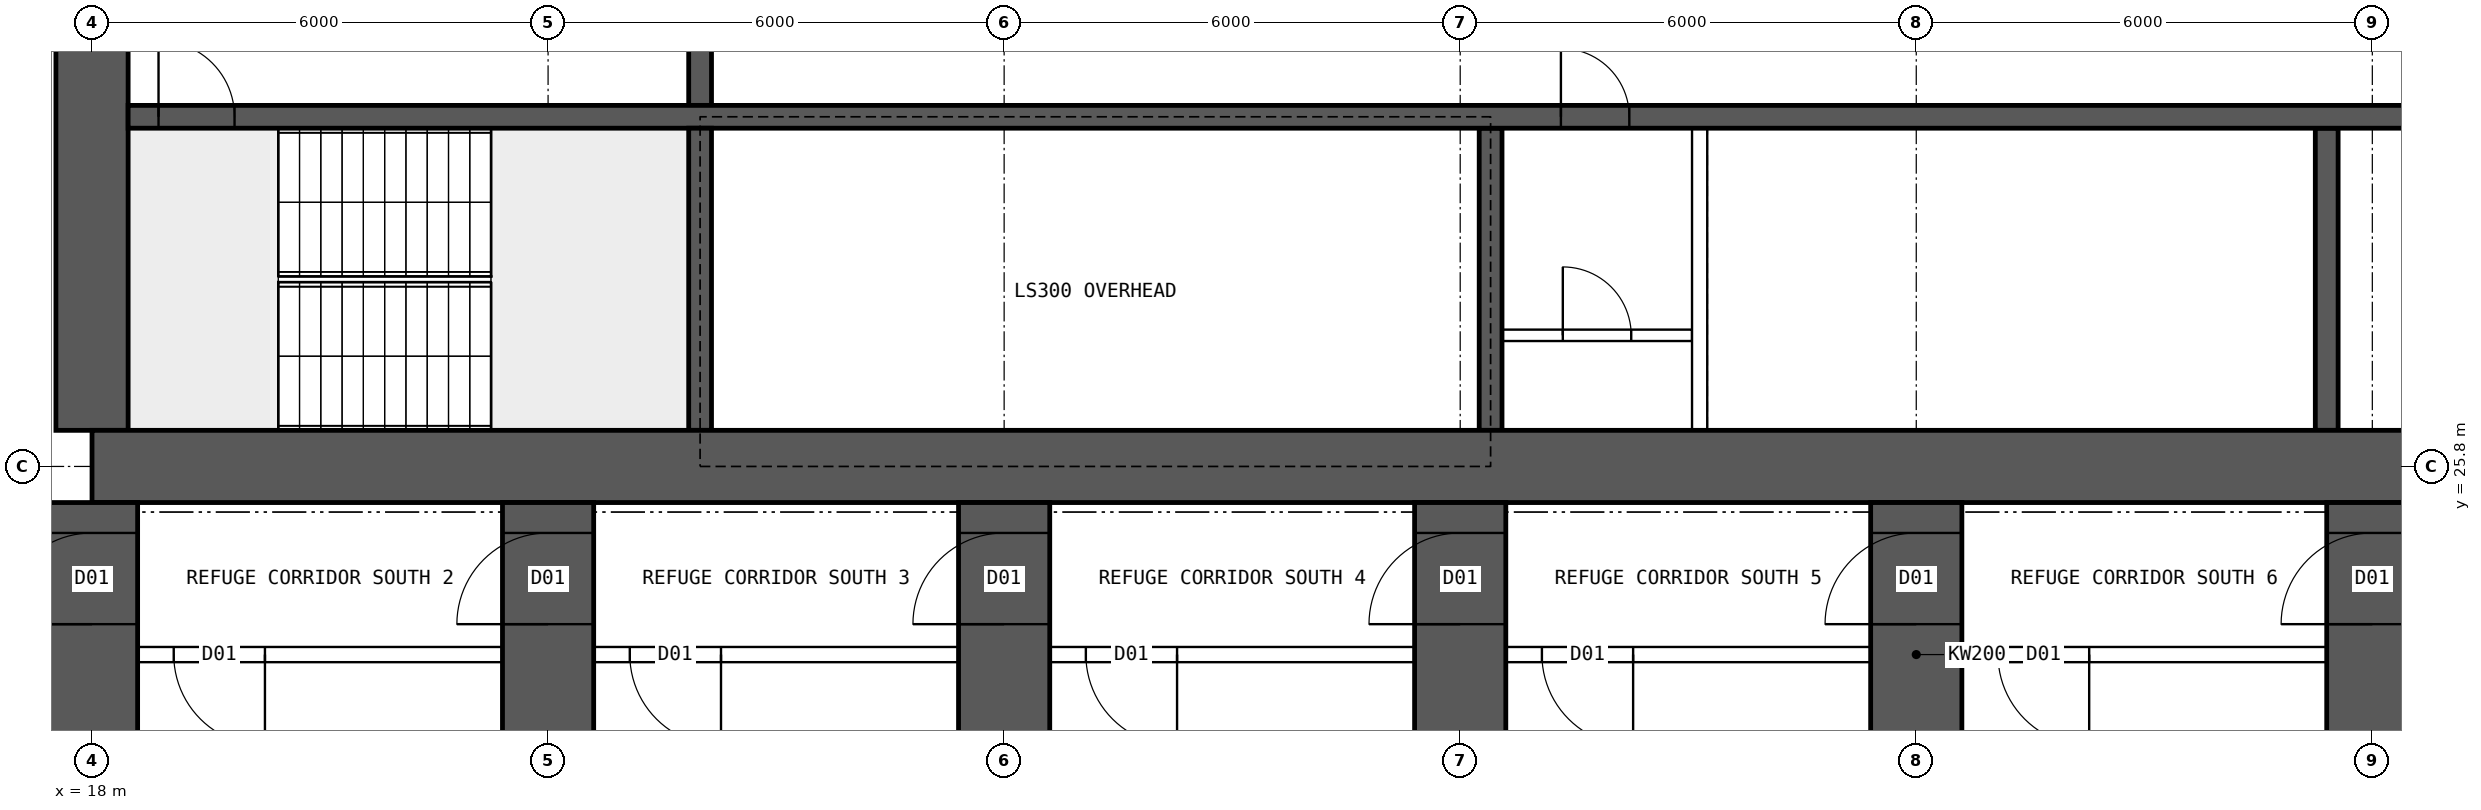
"""IFC4 building model, lengths in metres.
Left out: names, types, materials, properties, quantities, classifications, styles, units other than length and angle.
Written with IfcOpenShell. Run it as: python <this file> out.ifc"""

import sys

from ifc_helpers import new_model, si_unit, direction, frame, frame_2d, origin, place, context, subcontext, project, spatial, rectangle, extrude, element, fill, save


model = new_model("IFC4")
c1 = context("Model", 3, precision=1e-05, world=origin(), true_north=direction((0.0, 1.0)))
c2 = subcontext(c1, "Body", "Model", "MODEL_VIEW")
j1 = project(units=[si_unit("LENGTHUNIT", "METRE"), si_unit("PLANEANGLEUNIT", "RADIAN")], contexts=[c1])
p1 = place(None, origin())
s1 = spatial("IfcSite", under=j1, at=p1, CompositionType="ELEMENT")
p2 = place(p1, origin())
s2 = spatial("IfcBuilding", under=s1, at=p2, CompositionType="ELEMENT")
p3 = place(p2, frame((0.0, 0.0, 133.15)))
s3 = spatial("IfcBuildingStorey", under=s2, at=p3, CompositionType="ELEMENT", Elevation=133.15)
p4 = place(p3, frame((18.0, 25.8, 0.0), z_axis=(0.0, 0.0, 1.0), x_axis=(1.0, 0.0, 0.0)))
e1 = element("IfcWall", 1, at=p4, inside=s3, PredefinedType="SHEAR", context=c2, shape_type="SweptSolid", body=[
    extrude(rectangle(XDim=48.0, YDim=0.95, at=frame_2d((24.0, 0.0))), origin(), (0.0, 0.0, 1.0), 7.2),
])
p5 = place(p3, frame((18.0, 26.275, 0.0), z_axis=(0.0, 0.0, 1.0), x_axis=(0.0, 1.0, 0.0)))
e2 = element("IfcWall", 2, at=p5, inside=s3, PredefinedType="SHEAR", context=c2, shape_type="SweptSolid", body=[
    extrude(rectangle(XDim=11.45, YDim=0.95, at=frame_2d((5.725, 0.0))), origin(), (0.0, 0.0, 1.0), 7.2),
])
p6 = place(p5, frame((5.025, 0.0, 0.0)))
e3 = element("IfcOpeningElement", 3, at=p6, cuts=e2, PredefinedType="OPENING", context=c2, shape_type="SweptSolid", body=[
    extrude(rectangle(XDim=1.2, YDim=2.1, at=frame_2d((0.6, 1.05))), frame((0.0, 0.485, 0.0), z_axis=(0.0, -1.0, 0.0), x_axis=(1.0, 0.0, 0.0)), (0.0, 0.0, 1.0), 0.97),
])
p7 = place(p3, frame((18.475, 30.4, 0.0), z_axis=(0.0, 0.0, 1.0), x_axis=(1.0, 0.0, 0.0)))
e4 = element("IfcWall", 4, at=p7, inside=s3, PredefinedType="SHEAR", context=c2, shape_type="SweptSolid", body=[
    extrude(rectangle(XDim=47.05, YDim=0.3, at=frame_2d((23.525, 0.0))), origin(), (0.0, 0.0, 1.0), 7.2),
])
p8 = place(p7, frame((0.4, 0.0, 0.0)))
e5 = element("IfcOpeningElement", 5, at=p8, cuts=e4, PredefinedType="OPENING", context=c2, shape_type="SweptSolid", body=[
    extrude(rectangle(XDim=1.0, YDim=2.1, at=frame_2d((0.5, 1.05))), frame((0.0, 0.16, 0.0), z_axis=(0.0, -1.0, 0.0), x_axis=(1.0, 0.0, 0.0)), (0.0, 0.0, 1.0), 0.32),
])
p9 = place(p7, frame((45.65, 0.0, 0.0)))
e6 = element("IfcOpeningElement", 6, at=p9, cuts=e4, PredefinedType="OPENING", context=c2, shape_type="SweptSolid", body=[
    extrude(rectangle(XDim=1.0, YDim=2.1, at=frame_2d((0.5, 1.05))), frame((0.0, 0.16, 0.0), z_axis=(0.0, -1.0, 0.0), x_axis=(1.0, 0.0, 0.0)), (0.0, 0.0, 1.0), 0.32),
])
p10 = place(p7, frame((18.85, 0.0, 0.0)))
e7 = element("IfcOpeningElement", 7, at=p10, cuts=e4, PredefinedType="OPENING", context=c2, shape_type="SweptSolid", body=[
    extrude(rectangle(XDim=0.9, YDim=2.1, at=frame_2d((0.45, 1.05))), frame((0.0, 0.16, 0.0), z_axis=(0.0, -1.0, 0.0), x_axis=(1.0, 0.0, 0.0)), (0.0, 0.0, 1.0), 0.32),
])
p11 = place(p7, frame((30.142, 0.0, 0.0)))
e8 = element("IfcOpeningElement", 8, at=p11, cuts=e4, PredefinedType="OPENING", context=c2, shape_type="SweptSolid", body=[
    extrude(rectangle(XDim=1.1, YDim=2.1, at=frame_2d((0.55, 1.05))), frame((0.0, 0.16, 0.0), z_axis=(0.0, -1.0, 0.0), x_axis=(1.0, 0.0, 0.0)), (0.0, 0.0, 1.0), 0.32),
])
p12 = place(p7, frame((33.675, 0.0, 0.0)))
e9 = element("IfcOpeningElement", 9, at=p12, cuts=e4, PredefinedType="OPENING", context=c2, shape_type="SweptSolid", body=[
    extrude(rectangle(XDim=1.1, YDim=2.1, at=frame_2d((0.55, 1.05))), frame((0.0, 0.16, 0.0), z_axis=(0.0, -1.0, 0.0), x_axis=(1.0, 0.0, 0.0)), (0.0, 0.0, 1.0), 0.32),
])
p13 = place(p7, frame((37.208, 0.0, 0.0)))
e10 = element("IfcOpeningElement", 10, at=p13, cuts=e4, PredefinedType="OPENING", context=c2, shape_type="SweptSolid", body=[
    extrude(rectangle(XDim=1.1, YDim=2.1, at=frame_2d((0.55, 1.05))), frame((0.0, 0.16, 0.0), z_axis=(0.0, -1.0, 0.0), x_axis=(1.0, 0.0, 0.0)), (0.0, 0.0, 1.0), 0.32),
])
p14 = place(p3, frame((26.0, 26.275, 0.0), z_axis=(0.0, 0.0, 1.0), x_axis=(0.0, 1.0, 0.0)))
e11 = element("IfcWall", 11, at=p14, inside=s3, PredefinedType="SHEAR", context=c2, shape_type="SweptSolid", body=[
    extrude(rectangle(XDim=3.975, YDim=0.3, at=frame_2d((1.988, 0.0))), origin(), (0.0, 0.0, 1.0), 7.2),
])
p15 = place(p3, frame((26.0, 30.55, 0.0), z_axis=(0.0, 0.0, 1.0), x_axis=(0.0, 1.0, 0.0)))
e12 = element("IfcWall", 12, at=p15, inside=s3, PredefinedType="SHEAR", context=c2, shape_type="SweptSolid", body=[
    extrude(rectangle(XDim=3.9, YDim=0.3, at=frame_2d((1.95, 0.0))), origin(), (0.0, 0.0, 1.0), 7.2),
])
p16 = place(p15, frame((1.4, 0.0, 0.0)))
e13 = element("IfcOpeningElement", 13, at=p16, cuts=e12, PredefinedType="OPENING", context=c2, shape_type="SweptSolid", body=[
    extrude(rectangle(XDim=1.2, YDim=2.1, at=frame_2d((0.6, 1.05))), frame((0.0, 0.16, 0.0), z_axis=(0.0, -1.0, 0.0), x_axis=(1.0, 0.0, 0.0)), (0.0, 0.0, 1.0), 0.32),
])
for number, where, z_axis, x_axis in (
    (14, (36.4, 26.275, 0.0), (0.0, 0.0, 1.0), (0.0, 1.0, 0.0)),
    (15, (47.4, 26.275, 0.0), (0.0, 0.0, 1.0), (0.0, 1.0, 0.0)),
):
    element("IfcWall", number, at=place(p3, frame(where, z_axis=z_axis, x_axis=x_axis)), inside=s3, PredefinedType="SHEAR", context=c2, shape_type="SweptSolid", body=[
        extrude(rectangle(XDim=3.975, YDim=0.3, at=frame_2d((1.988, 0.0))), origin(), (0.0, 0.0, 1.0), 7.2),
    ])
p17 = place(p3, frame((18.0, 8.9, 0.0), z_axis=(0.0, 0.0, 1.0), x_axis=(0.0, 1.0, 0.0)))
e16 = element("IfcWall", 16, at=p17, inside=s3, PredefinedType="SHEAR", context=c2, shape_type="SweptSolid", body=[
    extrude(rectangle(XDim=16.425, YDim=1.2, at=frame_2d((8.212, 0.0))), origin(), (0.0, 0.0, 1.0), 7.2),
])
p18 = place(p17, frame((14.825, 0.0, 0.0)))
e17 = element("IfcOpeningElement", 17, at=p18, cuts=e16, PredefinedType="OPENING", context=c2, shape_type="SweptSolid", body=[
    extrude(rectangle(XDim=1.2, YDim=2.1, at=frame_2d((0.6, 1.05))), frame((0.0, 0.61, 0.0), z_axis=(0.0, -1.0, 0.0), x_axis=(1.0, 0.0, 0.0)), (0.0, 0.0, 1.0), 1.22),
])
p19 = place(p3, frame((24.0, 8.9, 0.0), z_axis=(0.0, 0.0, 1.0), x_axis=(0.0, 1.0, 0.0)))
e18 = element("IfcWall", 18, at=p19, inside=s3, PredefinedType="SHEAR", context=c2, shape_type="SweptSolid", body=[
    extrude(rectangle(XDim=16.425, YDim=1.2, at=frame_2d((8.212, 0.0))), origin(), (0.0, 0.0, 1.0), 7.2),
])
p20 = place(p19, frame((14.825, 0.0, 0.0)))
e19 = element("IfcOpeningElement", 19, at=p20, cuts=e18, PredefinedType="OPENING", context=c2, shape_type="SweptSolid", body=[
    extrude(rectangle(XDim=1.2, YDim=2.1, at=frame_2d((0.6, 1.05))), frame((0.0, 0.61, 0.0), z_axis=(0.0, -1.0, 0.0), x_axis=(1.0, 0.0, 0.0)), (0.0, 0.0, 1.0), 1.22),
])
p21 = place(p3, frame((30.0, 8.9, 0.0), z_axis=(0.0, 0.0, 1.0), x_axis=(0.0, 1.0, 0.0)))
e20 = element("IfcWall", 20, at=p21, inside=s3, PredefinedType="SHEAR", context=c2, shape_type="SweptSolid", body=[
    extrude(rectangle(XDim=16.425, YDim=1.2, at=frame_2d((8.212, 0.0))), origin(), (0.0, 0.0, 1.0), 7.2),
])
p22 = place(p21, frame((14.825, 0.0, 0.0)))
e21 = element("IfcOpeningElement", 21, at=p22, cuts=e20, PredefinedType="OPENING", context=c2, shape_type="SweptSolid", body=[
    extrude(rectangle(XDim=1.2, YDim=2.1, at=frame_2d((0.6, 1.05))), frame((0.0, 0.61, 0.0), z_axis=(0.0, -1.0, 0.0), x_axis=(1.0, 0.0, 0.0)), (0.0, 0.0, 1.0), 1.22),
])
p23 = place(p3, frame((36.0, 8.9, 0.0), z_axis=(0.0, 0.0, 1.0), x_axis=(0.0, 1.0, 0.0)))
e22 = element("IfcWall", 22, at=p23, inside=s3, PredefinedType="SHEAR", context=c2, shape_type="SweptSolid", body=[
    extrude(rectangle(XDim=16.425, YDim=1.2, at=frame_2d((8.212, 0.0))), origin(), (0.0, 0.0, 1.0), 7.2),
])
p24 = place(p23, frame((14.825, 0.0, 0.0)))
e23 = element("IfcOpeningElement", 23, at=p24, cuts=e22, PredefinedType="OPENING", context=c2, shape_type="SweptSolid", body=[
    extrude(rectangle(XDim=1.2, YDim=2.1, at=frame_2d((0.6, 1.05))), frame((0.0, 0.61, 0.0), z_axis=(0.0, -1.0, 0.0), x_axis=(1.0, 0.0, 0.0)), (0.0, 0.0, 1.0), 1.22),
])
p25 = place(p3, frame((42.0, 8.9, 0.0), z_axis=(0.0, 0.0, 1.0), x_axis=(0.0, 1.0, 0.0)))
e24 = element("IfcWall", 24, at=p25, inside=s3, PredefinedType="SHEAR", context=c2, shape_type="SweptSolid", body=[
    extrude(rectangle(XDim=16.425, YDim=1.2, at=frame_2d((8.212, 0.0))), origin(), (0.0, 0.0, 1.0), 7.2),
])
p26 = place(p25, frame((14.825, 0.0, 0.0)))
e25 = element("IfcOpeningElement", 25, at=p26, cuts=e24, PredefinedType="OPENING", context=c2, shape_type="SweptSolid", body=[
    extrude(rectangle(XDim=1.2, YDim=2.1, at=frame_2d((0.6, 1.05))), frame((0.0, 0.61, 0.0), z_axis=(0.0, -1.0, 0.0), x_axis=(1.0, 0.0, 0.0)), (0.0, 0.0, 1.0), 1.22),
])
p27 = place(p3, frame((48.0, 8.9, 0.0), z_axis=(0.0, 0.0, 1.0), x_axis=(0.0, 1.0, 0.0)))
e26 = element("IfcWall", 26, at=p27, inside=s3, PredefinedType="SHEAR", context=c2, shape_type="SweptSolid", body=[
    extrude(rectangle(XDim=16.425, YDim=1.2, at=frame_2d((8.212, 0.0))), origin(), (0.0, 0.0, 1.0), 7.2),
])
p28 = place(p27, frame((14.825, 0.0, 0.0)))
e27 = element("IfcOpeningElement", 27, at=p28, cuts=e26, PredefinedType="OPENING", context=c2, shape_type="SweptSolid", body=[
    extrude(rectangle(XDim=1.2, YDim=2.1, at=frame_2d((0.6, 1.05))), frame((0.0, 0.61, 0.0), z_axis=(0.0, -1.0, 0.0), x_axis=(1.0, 0.0, 0.0)), (0.0, 0.0, 1.0), 1.22),
])
p29 = place(p3, frame((36.55, 27.525, 0.0), z_axis=(0.0, 0.0, 1.0), x_axis=(1.0, 0.0, 0.0)))
e28 = element("IfcWall", 28, at=p29, inside=s3, PredefinedType="SOLIDWALL", context=c2, shape_type="SweptSolid", body=[
    extrude(rectangle(XDim=2.5, YDim=0.15, at=frame_2d((1.25, 0.0))), origin(), (0.0, 0.0, 1.0), 6.9),
])
p30 = place(p29, frame((0.8, 0.0, 0.0)))
e29 = element("IfcOpeningElement", 29, at=p30, cuts=e28, PredefinedType="OPENING", context=c2, shape_type="SweptSolid", body=[
    extrude(rectangle(XDim=0.9, YDim=2.1, at=frame_2d((0.45, 1.05))), frame((0.0, 0.085, 0.0), z_axis=(0.0, -1.0, 0.0), x_axis=(1.0, 0.0, 0.0)), (0.0, 0.0, 1.0), 0.17),
])
p31 = place(p3, frame((39.15, 26.275, 0.0), z_axis=(0.0, 0.0, 1.0), x_axis=(0.0, 1.0, 0.0)))
e30 = element("IfcWall", 30, at=p31, inside=s3, PredefinedType="SOLIDWALL", context=c2, shape_type="SweptSolid", body=[
    extrude(rectangle(XDim=3.975, YDim=0.2, at=frame_2d((1.988, 0.0))), origin(), (0.0, 0.0, 1.0), 6.9),
])
p32 = place(p3, frame((68.4, 23.325, 0.0), z_axis=(0.0, 0.0, 1.0), x_axis=(-1.0, 0.0, 0.0)))
e31 = element("IfcWall", 31, at=p32, inside=s3, PredefinedType="SOLIDWALL", context=c2, shape_type="SweptSolid", body=[
    extrude(rectangle(XDim=52.8, YDim=0.2, at=frame_2d((26.4, 0.0))), origin(), (0.0, 0.0, 1.0), 6.9),
])
p33 = place(p32, frame((51.0, 0.0, 0.0)))
e32 = element("IfcOpeningElement", 32, at=p33, cuts=e31, PredefinedType="OPENING", context=c2, shape_type="SweptSolid", body=[
    extrude(rectangle(XDim=1.2, YDim=2.1, at=frame_2d((0.6, 1.05))), frame((0.0, 0.11, 0.0), z_axis=(0.0, -1.0, 0.0), x_axis=(1.0, 0.0, 0.0)), (0.0, 0.0, 1.0), 0.22),
])
p34 = place(p32, frame((48.125, 0.0, 0.0)))
e33 = element("IfcOpeningElement", 33, at=p34, cuts=e31, PredefinedType="OPENING", context=c2, shape_type="SweptSolid", body=[
    extrude(rectangle(XDim=1.2, YDim=2.1, at=frame_2d((0.6, 1.05))), frame((0.0, 0.11, 0.0), z_axis=(0.0, -1.0, 0.0), x_axis=(1.0, 0.0, 0.0)), (0.0, 0.0, 1.0), 0.22),
])
p35 = place(p32, frame((42.125, 0.0, 0.0)))
e34 = element("IfcOpeningElement", 34, at=p35, cuts=e31, PredefinedType="OPENING", context=c2, shape_type="SweptSolid", body=[
    extrude(rectangle(XDim=1.2, YDim=2.1, at=frame_2d((0.6, 1.05))), frame((0.0, 0.11, 0.0), z_axis=(0.0, -1.0, 0.0), x_axis=(1.0, 0.0, 0.0)), (0.0, 0.0, 1.0), 0.22),
])
p36 = place(p32, frame((36.125, 0.0, 0.0)))
e35 = element("IfcOpeningElement", 35, at=p36, cuts=e31, PredefinedType="OPENING", context=c2, shape_type="SweptSolid", body=[
    extrude(rectangle(XDim=1.2, YDim=2.1, at=frame_2d((0.6, 1.05))), frame((0.0, 0.11, 0.0), z_axis=(0.0, -1.0, 0.0), x_axis=(1.0, 0.0, 0.0)), (0.0, 0.0, 1.0), 0.22),
])
p37 = place(p32, frame((30.125, 0.0, 0.0)))
e36 = element("IfcOpeningElement", 36, at=p37, cuts=e31, PredefinedType="OPENING", context=c2, shape_type="SweptSolid", body=[
    extrude(rectangle(XDim=1.2, YDim=2.1, at=frame_2d((0.6, 1.05))), frame((0.0, 0.11, 0.0), z_axis=(0.0, -1.0, 0.0), x_axis=(1.0, 0.0, 0.0)), (0.0, 0.0, 1.0), 0.22),
])
p38 = place(p32, frame((24.125, 0.0, 0.0)))
e37 = element("IfcOpeningElement", 37, at=p38, cuts=e31, PredefinedType="OPENING", context=c2, shape_type="SweptSolid", body=[
    extrude(rectangle(XDim=1.2, YDim=2.1, at=frame_2d((0.6, 1.05))), frame((0.0, 0.11, 0.0), z_axis=(0.0, -1.0, 0.0), x_axis=(1.0, 0.0, 0.0)), (0.0, 0.0, 1.0), 0.22),
])
p39 = place(p32, frame((18.125, 0.0, 0.0)))
e38 = element("IfcOpeningElement", 38, at=p39, cuts=e31, PredefinedType="OPENING", context=c2, shape_type="SweptSolid", body=[
    extrude(rectangle(XDim=1.2, YDim=2.1, at=frame_2d((0.6, 1.05))), frame((0.0, 0.11, 0.0), z_axis=(0.0, -1.0, 0.0), x_axis=(1.0, 0.0, 0.0)), (0.0, 0.0, 1.0), 0.22),
])
p40 = place(p32, frame((12.125, 0.0, 0.0)))
e39 = element("IfcOpeningElement", 39, at=p40, cuts=e31, PredefinedType="OPENING", context=c2, shape_type="SweptSolid", body=[
    extrude(rectangle(XDim=1.2, YDim=2.1, at=frame_2d((0.6, 1.05))), frame((0.0, 0.11, 0.0), z_axis=(0.0, -1.0, 0.0), x_axis=(1.0, 0.0, 0.0)), (0.0, 0.0, 1.0), 0.22),
])
p41 = place(p32, frame((6.125, 0.0, 0.0)))
e40 = element("IfcOpeningElement", 40, at=p41, cuts=e31, PredefinedType="OPENING", context=c2, shape_type="SweptSolid", body=[
    extrude(rectangle(XDim=1.2, YDim=2.1, at=frame_2d((0.6, 1.05))), frame((0.0, 0.11, 0.0), z_axis=(0.0, -1.0, 0.0), x_axis=(1.0, 0.0, 0.0)), (0.0, 0.0, 1.0), 0.22),
])
p42 = place(p32, frame((0.125, 0.0, 0.0)))
e41 = element("IfcOpeningElement", 41, at=p42, cuts=e31, PredefinedType="OPENING", context=c2, shape_type="SweptSolid", body=[
    extrude(rectangle(XDim=1.2, YDim=2.1, at=frame_2d((0.6, 1.05))), frame((0.0, 0.11, 0.0), z_axis=(0.0, -1.0, 0.0), x_axis=(1.0, 0.0, 0.0)), (0.0, 0.0, 1.0), 0.22),
])
p43 = place(p8, origin())
e42 = element("IfcDoor", 42, at=p43, inside=s3, OperationType="SINGLE_SWING_LEFT", PredefinedType="DOOR", context=c2, shape_type="SweptSolid", body=[
    extrude(rectangle(XDim=1.0, YDim=2.1, at=frame_2d((0.5, 1.05))), frame((0.0, 0.025, 0.0), z_axis=(0.0, -1.0, 0.0), x_axis=(1.0, 0.0, 0.0)), (0.0, 0.0, 1.0), 0.05),
])
fill(e5, e42)
p44 = place(p30, origin())
e43 = element("IfcDoor", 43, at=p44, inside=s3, OperationType="SINGLE_SWING_LEFT", PredefinedType="DOOR", context=c2, shape_type="SweptSolid", body=[
    extrude(rectangle(XDim=0.9, YDim=2.1, at=frame_2d((0.45, 1.05))), frame((0.0, 0.025, 0.0), z_axis=(0.0, -1.0, 0.0), x_axis=(1.0, 0.0, 0.0)), (0.0, 0.0, 1.0), 0.05),
])
fill(e29, e43)
p45 = place(p10, origin())
e44 = element("IfcDoor", 44, at=p45, inside=s3, OperationType="SINGLE_SWING_LEFT", PredefinedType="DOOR", context=c2, shape_type="SweptSolid", body=[
    extrude(rectangle(XDim=0.9, YDim=2.1, at=frame_2d((0.45, 1.05))), frame((0.0, 0.025, 0.0), z_axis=(0.0, -1.0, 0.0), x_axis=(1.0, 0.0, 0.0)), (0.0, 0.0, 1.0), 0.05),
])
fill(e7, e44)
p46 = place(p34, origin())
e45 = element("IfcDoor", 45, at=p46, inside=s3, OperationType="SINGLE_SWING_LEFT", PredefinedType="DOOR", context=c2, shape_type="SweptSolid", body=[
    extrude(rectangle(XDim=1.2, YDim=2.1, at=frame_2d((0.6, 1.05))), frame((0.0, 0.025, 0.0), z_axis=(0.0, -1.0, 0.0), x_axis=(1.0, 0.0, 0.0)), (0.0, 0.0, 1.0), 0.05),
])
fill(e33, e45)
p47 = place(p35, origin())
e46 = element("IfcDoor", 46, at=p47, inside=s3, OperationType="SINGLE_SWING_LEFT", PredefinedType="DOOR", context=c2, shape_type="SweptSolid", body=[
    extrude(rectangle(XDim=1.2, YDim=2.1, at=frame_2d((0.6, 1.05))), frame((0.0, 0.025, 0.0), z_axis=(0.0, -1.0, 0.0), x_axis=(1.0, 0.0, 0.0)), (0.0, 0.0, 1.0), 0.05),
])
fill(e34, e46)
p48 = place(p36, origin())
e47 = element("IfcDoor", 47, at=p48, inside=s3, OperationType="SINGLE_SWING_LEFT", PredefinedType="DOOR", context=c2, shape_type="SweptSolid", body=[
    extrude(rectangle(XDim=1.2, YDim=2.1, at=frame_2d((0.6, 1.05))), frame((0.0, 0.025, 0.0), z_axis=(0.0, -1.0, 0.0), x_axis=(1.0, 0.0, 0.0)), (0.0, 0.0, 1.0), 0.05),
])
fill(e35, e47)
p49 = place(p37, origin())
e48 = element("IfcDoor", 48, at=p49, inside=s3, OperationType="SINGLE_SWING_LEFT", PredefinedType="DOOR", context=c2, shape_type="SweptSolid", body=[
    extrude(rectangle(XDim=1.2, YDim=2.1, at=frame_2d((0.6, 1.05))), frame((0.0, 0.025, 0.0), z_axis=(0.0, -1.0, 0.0), x_axis=(1.0, 0.0, 0.0)), (0.0, 0.0, 1.0), 0.05),
])
fill(e36, e48)
p50 = place(p38, origin())
e49 = element("IfcDoor", 49, at=p50, inside=s3, OperationType="SINGLE_SWING_LEFT", PredefinedType="DOOR", context=c2, shape_type="SweptSolid", body=[
    extrude(rectangle(XDim=1.2, YDim=2.1, at=frame_2d((0.6, 1.05))), frame((0.0, 0.025, 0.0), z_axis=(0.0, -1.0, 0.0), x_axis=(1.0, 0.0, 0.0)), (0.0, 0.0, 1.0), 0.05),
])
fill(e37, e49)
p51 = place(p18, origin())
e50 = element("IfcDoor", 50, at=p51, inside=s3, OperationType="SINGLE_SWING_LEFT", PredefinedType="DOOR", context=c2, shape_type="SweptSolid", body=[
    extrude(rectangle(XDim=1.2, YDim=2.1, at=frame_2d((0.6, 1.05))), frame((0.0, 0.025, 0.0), z_axis=(0.0, -1.0, 0.0), x_axis=(1.0, 0.0, 0.0)), (0.0, 0.0, 1.0), 0.05),
])
fill(e17, e50)
p52 = place(p20, origin())
e51 = element("IfcDoor", 51, at=p52, inside=s3, OperationType="SINGLE_SWING_LEFT", PredefinedType="DOOR", context=c2, shape_type="SweptSolid", body=[
    extrude(rectangle(XDim=1.2, YDim=2.1, at=frame_2d((0.6, 1.05))), frame((0.0, 0.025, 0.0), z_axis=(0.0, -1.0, 0.0), x_axis=(1.0, 0.0, 0.0)), (0.0, 0.0, 1.0), 0.05),
])
fill(e19, e51)
p53 = place(p22, origin())
e52 = element("IfcDoor", 52, at=p53, inside=s3, OperationType="SINGLE_SWING_LEFT", PredefinedType="DOOR", context=c2, shape_type="SweptSolid", body=[
    extrude(rectangle(XDim=1.2, YDim=2.1, at=frame_2d((0.6, 1.05))), frame((0.0, 0.025, 0.0), z_axis=(0.0, -1.0, 0.0), x_axis=(1.0, 0.0, 0.0)), (0.0, 0.0, 1.0), 0.05),
])
fill(e21, e52)
p54 = place(p24, origin())
e53 = element("IfcDoor", 53, at=p54, inside=s3, OperationType="SINGLE_SWING_LEFT", PredefinedType="DOOR", context=c2, shape_type="SweptSolid", body=[
    extrude(rectangle(XDim=1.2, YDim=2.1, at=frame_2d((0.6, 1.05))), frame((0.0, 0.025, 0.0), z_axis=(0.0, -1.0, 0.0), x_axis=(1.0, 0.0, 0.0)), (0.0, 0.0, 1.0), 0.05),
])
fill(e23, e53)
p55 = place(p26, origin())
e54 = element("IfcDoor", 54, at=p55, inside=s3, OperationType="SINGLE_SWING_LEFT", PredefinedType="DOOR", context=c2, shape_type="SweptSolid", body=[
    extrude(rectangle(XDim=1.2, YDim=2.1, at=frame_2d((0.6, 1.05))), frame((0.0, 0.025, 0.0), z_axis=(0.0, -1.0, 0.0), x_axis=(1.0, 0.0, 0.0)), (0.0, 0.0, 1.0), 0.05),
])
fill(e25, e54)
p56 = place(p28, origin())
e55 = element("IfcDoor", 55, at=p56, inside=s3, OperationType="SINGLE_SWING_LEFT", PredefinedType="DOOR", context=c2, shape_type="SweptSolid", body=[
    extrude(rectangle(XDim=1.2, YDim=2.1, at=frame_2d((0.6, 1.05))), frame((0.0, 0.025, 0.0), z_axis=(0.0, -1.0, 0.0), x_axis=(1.0, 0.0, 0.0)), (0.0, 0.0, 1.0), 0.05),
])
fill(e27, e55)
save(model, sys.argv[1])
